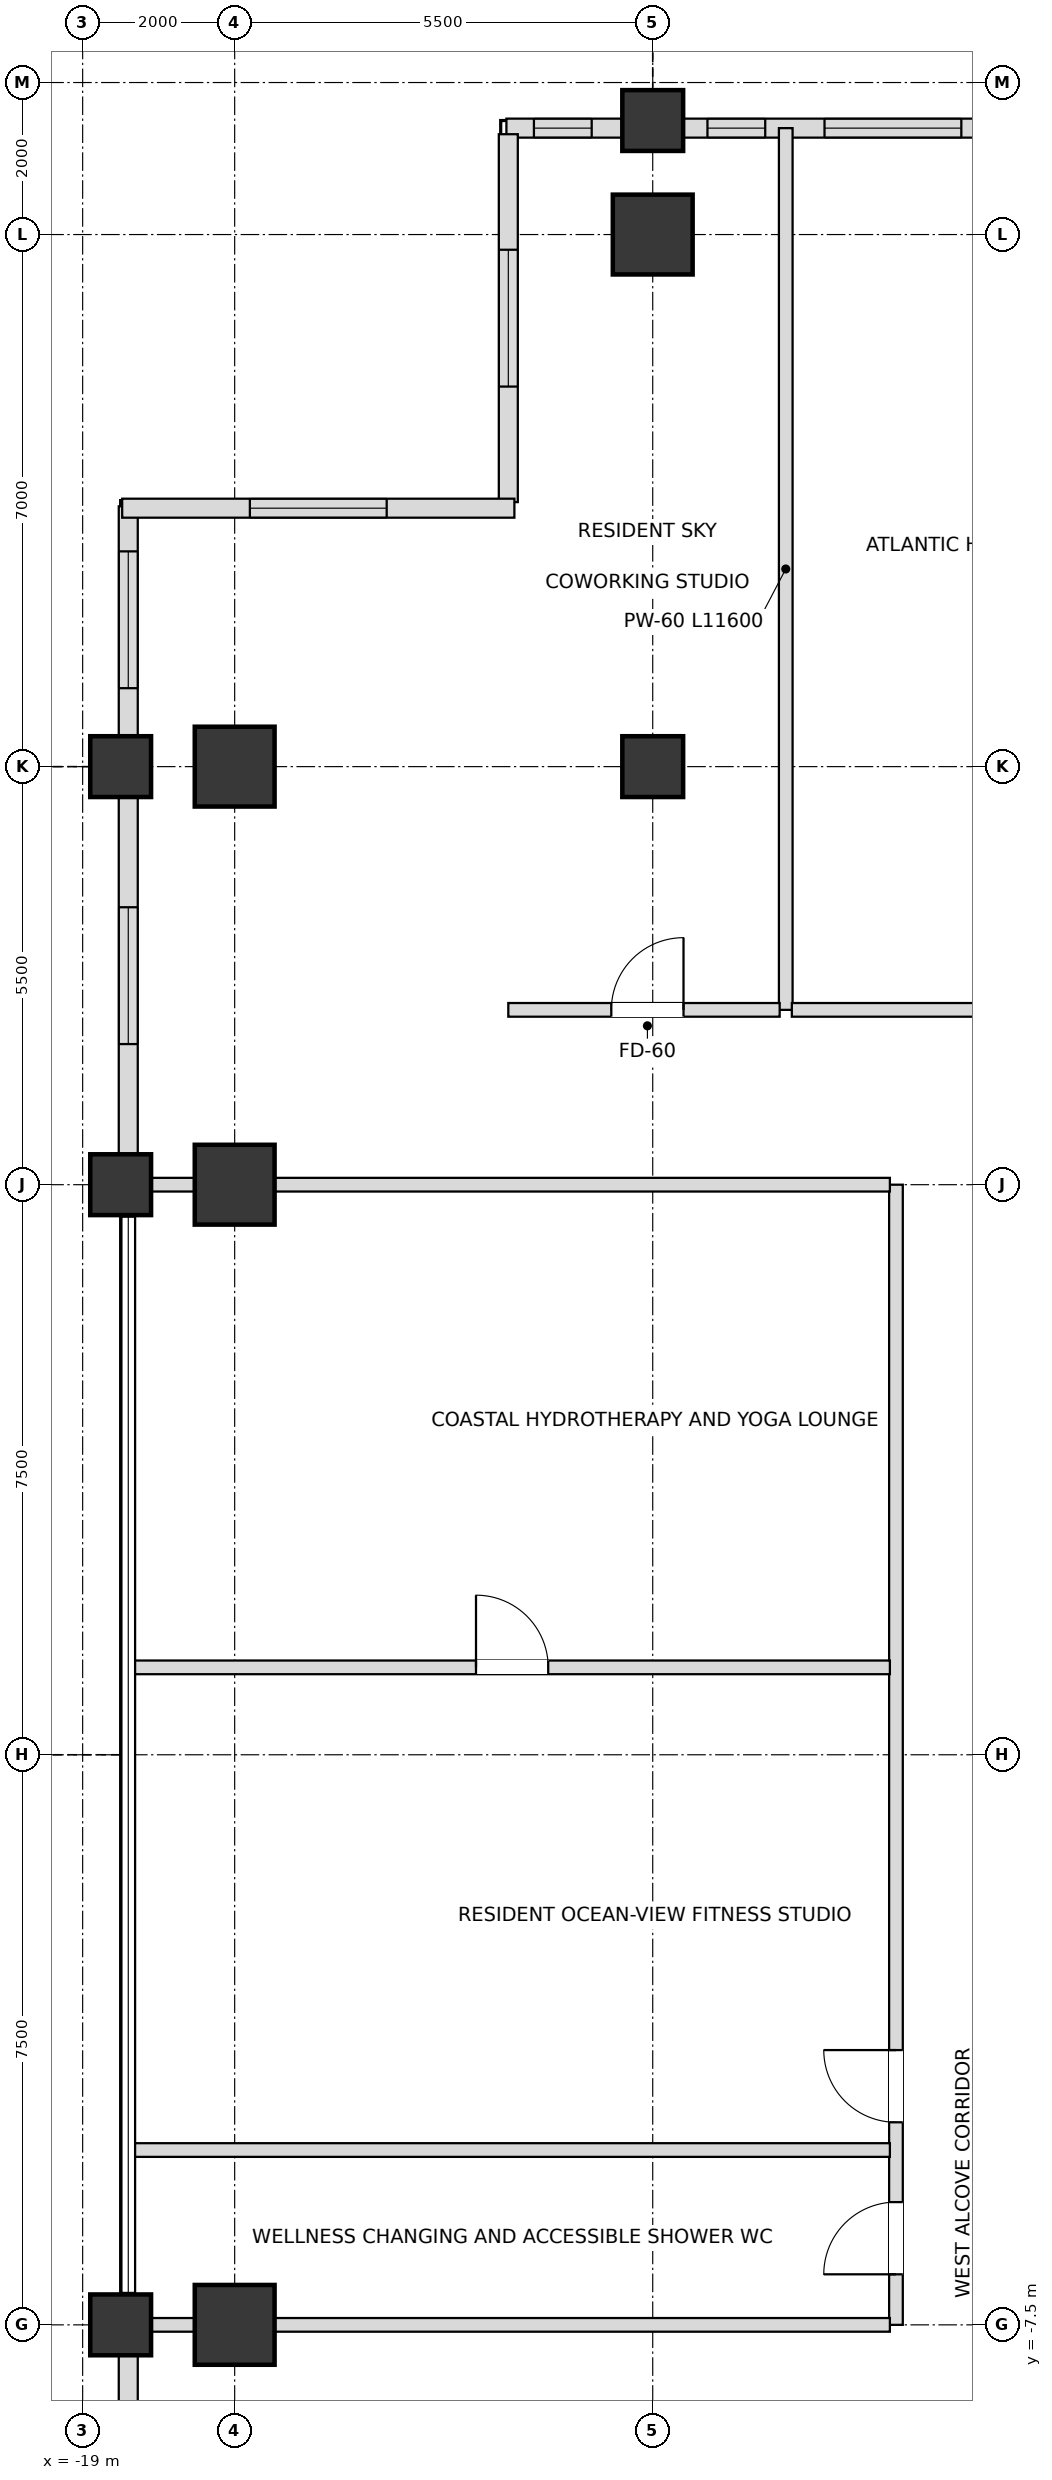
"""IFC4 building model, lengths in metres.
Left out: names, types, materials, properties, quantities, classifications, styles, units other than length and angle.
Written with IfcOpenShell. Run it as: python <this file> out.ifc"""

import sys

from ifc_helpers import new_model, si_unit, direction, frame, frame_2d, origin, origin_2d, place, context, subcontext, project, spatial, rectangle, extrude, element, fill, save


model = new_model("IFC4")
c1 = context("Model", 3, precision=1e-05, world=origin(), true_north=direction((0.0, 1.0)))
c2 = subcontext(c1, "Body", "Model", "MODEL_VIEW")
j1 = project(units=[si_unit("LENGTHUNIT", "METRE"), si_unit("PLANEANGLEUNIT", "RADIAN")], contexts=[c1])
p1 = place(None, origin())
s1 = spatial("IfcSite", under=j1, at=p1, CompositionType="ELEMENT")
p2 = place(p1, origin())
s2 = spatial("IfcBuilding", under=s1, at=p2, CompositionType="ELEMENT")
p3 = place(p2, frame((0.0, 0.0, 208.8)))
s3 = spatial("IfcBuildingStorey", under=s2, at=p3, CompositionType="ELEMENT", Elevation=208.8)
for number, where, z_axis, x_axis in (
    (1, (-11.5, 20.0, 0.0), (0.0, 0.0, 1.0), (1.0, 0.0, 0.0)),
    (2, (-17.0, 13.0, 0.0), (0.0, 0.0, 1.0), (1.0, 0.0, 0.0)),
    (3, (-17.0, 7.5, 0.0), (0.0, 0.0, 1.0), (1.0, 0.0, 0.0)),
    (4, (-17.0, -7.5, 0.0), (0.0, 0.0, 1.0), (1.0, 0.0, 0.0)),
):
    element("IfcColumn", number, at=place(p3, frame(where, z_axis=z_axis, x_axis=x_axis)), inside=s3, PredefinedType="USERDEFINED", context=c2, shape_type="SweptSolid", body=[
        extrude(rectangle(XDim=1.05, YDim=1.05, at=origin_2d()), origin(), (0.0, 0.0, 1.0), 3.6),
    ])
for number, where, z_axis, x_axis in (
    (5, (-11.5, 13.0, 0.0), (0.0, 0.0, 1.0), (1.0, 0.0, 0.0)),
    (6, (-18.5, -7.5, 0.0), (0.0, 0.0, 1.0), (1.0, 0.0, 0.0)),
    (7, (-18.5, 7.5, 0.0), (0.0, 0.0, 1.0), (1.0, 0.0, 0.0)),
    (8, (-18.5, 13.0, 0.0), (0.0, 0.0, 1.0), (1.0, 0.0, 0.0)),
    (9, (-11.5, 21.5, 0.0), (0.0, 0.0, 1.0), (1.0, 0.0, 0.0)),
):
    element("IfcColumn", number, at=place(p3, frame(where, z_axis=z_axis, x_axis=x_axis)), inside=s3, PredefinedType="COLUMN", context=c2, shape_type="SweptSolid", body=[
        extrude(rectangle(XDim=0.8, YDim=0.8, at=origin_2d()), origin(), (0.0, 0.0, 1.0), 3.6),
    ])
p4 = place(p3, frame((-6.895, 21.4, 0.0), z_axis=(0.0, 0.0, 1.0), x_axis=(-1.0, 0.0, 0.0)))
e10 = element("IfcWall", 10, at=p4, inside=s3, PredefinedType="SOLIDWALL", context=c2, shape_type="SweptSolid", body=[
    extrude(rectangle(XDim=4.21, YDim=0.25, at=frame_2d((2.105, 0.0))), origin(), (0.0, 0.0, 1.0), 2.59),
])
p5 = place(p4, frame((0.545, 0.0, 0.72)))
e11 = element("IfcOpeningElement", 11, at=p5, cuts=e10, PredefinedType="OPENING", context=c2, shape_type="SweptSolid", body=[
    extrude(rectangle(XDim=1.8, YDim=1.68, at=frame_2d((0.9, 0.84))), frame((0.0, 0.135, 0.0), z_axis=(0.0, -1.0, 0.0), x_axis=(1.0, 0.0, 0.0)), (0.0, 0.0, 1.0), 0.27),
])
p6 = place(p4, frame((3.125, 0.0, 0.72)))
e12 = element("IfcOpeningElement", 12, at=p6, cuts=e10, PredefinedType="OPENING", context=c2, shape_type="SweptSolid", body=[
    extrude(rectangle(XDim=0.76, YDim=1.68, at=frame_2d((0.38, 0.84))), frame((0.0, 0.135, 0.0), z_axis=(0.0, -1.0, 0.0), x_axis=(1.0, 0.0, 0.0)), (0.0, 0.0, 1.0), 0.27),
])
p7 = place(p3, frame((-11.895, 21.4, 0.0), z_axis=(0.0, 0.0, 1.0), x_axis=(-1.0, 0.0, 0.0)))
e13 = element("IfcWall", 13, at=p7, inside=s3, PredefinedType="SOLIDWALL", context=c2, shape_type="SweptSolid", body=[
    extrude(rectangle(XDim=1.53, YDim=0.25, at=frame_2d((0.765, 0.0))), origin(), (0.0, 0.0, 1.0), 2.59),
])
p8 = place(p7, frame((0.408, 0.0, 0.72)))
e14 = element("IfcOpeningElement", 14, at=p8, cuts=e13, PredefinedType="OPENING", context=c2, shape_type="SweptSolid", body=[
    extrude(rectangle(XDim=0.76, YDim=1.68, at=frame_2d((0.38, 0.84))), frame((0.0, 0.135, 0.0), z_axis=(0.0, -1.0, 0.0), x_axis=(1.0, 0.0, 0.0)), (0.0, 0.0, 1.0), 0.27),
])
p9 = place(p3, frame((-18.4, 16.425, 0.0), z_axis=(0.0, 0.0, 1.0), x_axis=(0.0, -1.0, 0.0)))
e15 = element("IfcWall", 15, at=p9, inside=s3, PredefinedType="SOLIDWALL", context=c2, shape_type="SweptSolid", body=[
    extrude(rectangle(XDim=3.03, YDim=0.25, at=frame_2d((1.515, 0.0))), origin(), (0.0, 0.0, 1.0), 2.59),
])
p10 = place(p9, frame((0.593, 0.0, 0.72)))
e16 = element("IfcOpeningElement", 16, at=p10, cuts=e15, PredefinedType="OPENING", context=c2, shape_type="SweptSolid", body=[
    extrude(rectangle(XDim=1.8, YDim=1.68, at=frame_2d((0.9, 0.84))), frame((0.0, 0.135, 0.0), z_axis=(0.0, -1.0, 0.0), x_axis=(1.0, 0.0, 0.0)), (0.0, 0.0, 1.0), 0.27),
])
p11 = place(p3, frame((-18.4, 12.605, 0.0), z_axis=(0.0, 0.0, 1.0), x_axis=(0.0, -1.0, 0.0)))
e17 = element("IfcWall", 17, at=p11, inside=s3, PredefinedType="SOLIDWALL", context=c2, shape_type="SweptSolid", body=[
    extrude(rectangle(XDim=4.71, YDim=0.25, at=frame_2d((2.355, 0.0))), origin(), (0.0, 0.0, 1.0), 2.59),
])
p12 = place(p11, frame((1.455, 0.0, 0.72)))
e18 = element("IfcOpeningElement", 18, at=p12, cuts=e17, PredefinedType="OPENING", context=c2, shape_type="SweptSolid", body=[
    extrude(rectangle(XDim=1.8, YDim=1.68, at=frame_2d((0.9, 0.84))), frame((0.0, 0.135, 0.0), z_axis=(0.0, -1.0, 0.0), x_axis=(1.0, 0.0, 0.0)), (0.0, 0.0, 1.0), 0.27),
])
p13 = place(p3, frame((-18.4, -7.895, 0.0), z_axis=(0.0, 0.0, 1.0), x_axis=(0.0, -1.0, 0.0)))
e19 = element("IfcWall", 19, at=p13, inside=s3, PredefinedType="SOLIDWALL", context=c2, shape_type="SweptSolid", body=[
    extrude(rectangle(XDim=4.71, YDim=0.25, at=frame_2d((2.355, 0.0))), origin(), (0.0, 0.0, 1.0), 2.59),
])
p14 = place(p13, frame((1.455, 0.0, 0.72)))
e20 = element("IfcOpeningElement", 20, at=p14, cuts=e19, PredefinedType="OPENING", context=c2, shape_type="SweptSolid", body=[
    extrude(rectangle(XDim=1.8, YDim=1.68, at=frame_2d((0.9, 0.84))), frame((0.0, 0.135, 0.0), z_axis=(0.0, -1.0, 0.0), x_axis=(1.0, 0.0, 0.0)), (0.0, 0.0, 1.0), 0.27),
])
p15 = place(p3, frame((-13.4, 21.32, 0.0), z_axis=(0.0, 0.0, 1.0), x_axis=(0.0, -1.0, 0.0)))
e21 = element("IfcWall", 21, at=p15, inside=s3, PredefinedType="SOLIDWALL", context=c2, shape_type="SweptSolid", body=[
    extrude(rectangle(XDim=4.84, YDim=0.25, at=frame_2d((2.42, 0.0))), origin(), (0.0, 0.0, 1.0), 2.59),
])
p16 = place(p15, frame((1.52, 0.0, 0.72)))
e22 = element("IfcOpeningElement", 22, at=p16, cuts=e21, PredefinedType="OPENING", context=c2, shape_type="SweptSolid", body=[
    extrude(rectangle(XDim=1.8, YDim=1.68, at=frame_2d((0.9, 0.84))), frame((0.0, 0.135, 0.0), z_axis=(0.0, -1.0, 0.0), x_axis=(1.0, 0.0, 0.0)), (0.0, 0.0, 1.0), 0.27),
])
p17 = place(p3, frame((-13.32, 16.4, 0.0), z_axis=(0.0, 0.0, 1.0), x_axis=(-1.0, 0.0, 0.0)))
e23 = element("IfcWall", 23, at=p17, inside=s3, PredefinedType="SOLIDWALL", context=c2, shape_type="SweptSolid", body=[
    extrude(rectangle(XDim=5.16, YDim=0.25, at=frame_2d((2.58, 0.0))), origin(), (0.0, 0.0, 1.0), 2.59),
])
p18 = place(p17, frame((1.68, 0.0, 0.72)))
e24 = element("IfcOpeningElement", 24, at=p18, cuts=e23, PredefinedType="OPENING", context=c2, shape_type="SweptSolid", body=[
    extrude(rectangle(XDim=1.8, YDim=1.68, at=frame_2d((0.9, 0.84))), frame((0.0, 0.135, 0.0), z_axis=(0.0, -1.0, 0.0), x_axis=(1.0, 0.0, 0.0)), (0.0, 0.0, 1.0), 0.27),
])
p19 = place(p3, frame((-9.75, 9.8, 0.0), z_axis=(0.0, 0.0, 1.0), x_axis=(0.0, 1.0, 0.0)))
e25 = element("IfcWall", 25, at=p19, inside=s3, PredefinedType="PARTITIONING", context=c2, shape_type="SweptSolid", body=[
    extrude(rectangle(XDim=11.6, YDim=0.18, at=frame_2d((5.8, 0.0))), origin(), (0.0, 0.0, 1.0), 2.746),
])
p20 = place(p3, frame((-8.3, -7.5, 0.0), z_axis=(0.0, 0.0, 1.0), x_axis=(0.0, 1.0, 0.0)))
e26 = element("IfcWall", 26, at=p20, inside=s3, PredefinedType="PARTITIONING", context=c2, shape_type="SweptSolid", body=[
    extrude(rectangle(XDim=15.0, YDim=0.18, at=frame_2d((7.5, 0.0))), origin(), (0.0, 0.0, 1.0), 3.3),
])
p21 = place(p20, frame((0.665, 0.0, 0.0)))
e27 = element("IfcOpeningElement", 27, at=p21, cuts=e26, PredefinedType="OPENING", context=c2, shape_type="SweptSolid", body=[
    extrude(rectangle(XDim=0.95, YDim=2.15, at=frame_2d((0.475, 1.075))), frame((0.0, 0.1, 0.0), z_axis=(0.0, -1.0, 0.0), x_axis=(1.0, 0.0, 0.0)), (0.0, 0.0, 1.0), 0.2),
])
p22 = place(p20, frame((2.665, 0.0, 0.0)))
e28 = element("IfcOpeningElement", 28, at=p22, cuts=e26, PredefinedType="OPENING", context=c2, shape_type="SweptSolid", body=[
    extrude(rectangle(XDim=0.95, YDim=2.15, at=frame_2d((0.475, 1.075))), frame((0.0, 0.1, 0.0), z_axis=(0.0, -1.0, 0.0), x_axis=(1.0, 0.0, 0.0)), (0.0, 0.0, 1.0), 0.2),
])
p23 = place(p3, frame((-18.4, -7.5, 0.0), z_axis=(0.0, 0.0, 1.0), x_axis=(1.0, 0.0, 0.0)))
e29 = element("IfcWall", 29, at=p23, inside=s3, PredefinedType="PARTITIONING", context=c2, shape_type="SweptSolid", body=[
    extrude(rectangle(XDim=10.02, YDim=0.18, at=frame_2d((5.01, 0.0))), origin(), (0.0, 0.0, 1.0), 2.746),
])
p24 = place(p3, frame((-18.32, -5.2, 0.0), z_axis=(0.0, 0.0, 1.0), x_axis=(1.0, 0.0, 0.0)))
e30 = element("IfcWall", 30, at=p24, inside=s3, PredefinedType="PARTITIONING", context=c2, shape_type="SweptSolid", body=[
    extrude(rectangle(XDim=9.94, YDim=0.18, at=frame_2d((4.97, 0.0))), origin(), (0.0, 0.0, 1.0), 2.746),
])
p25 = place(p3, frame((-18.32, 1.15, 0.0), z_axis=(0.0, 0.0, 1.0), x_axis=(1.0, 0.0, 0.0)))
e31 = element("IfcWall", 31, at=p25, inside=s3, PredefinedType="PARTITIONING", context=c2, shape_type="SweptSolid", body=[
    extrude(rectangle(XDim=9.94, YDim=0.18, at=frame_2d((4.97, 0.0))), origin(), (0.0, 0.0, 1.0), 2.746),
])
p26 = place(p25, frame((4.495, 0.0, 0.0)))
e32 = element("IfcOpeningElement", 32, at=p26, cuts=e31, PredefinedType="OPENING", context=c2, shape_type="SweptSolid", body=[
    extrude(rectangle(XDim=0.95, YDim=2.15, at=frame_2d((0.475, 1.075))), frame((0.0, 0.1, 0.0), z_axis=(0.0, -1.0, 0.0), x_axis=(1.0, 0.0, 0.0)), (0.0, 0.0, 1.0), 0.2),
])
p27 = place(p3, frame((-18.4, 7.5, 0.0), z_axis=(0.0, 0.0, 1.0), x_axis=(1.0, 0.0, 0.0)))
e33 = element("IfcWall", 33, at=p27, inside=s3, PredefinedType="PARTITIONING", context=c2, shape_type="SweptSolid", body=[
    extrude(rectangle(XDim=10.02, YDim=0.18, at=frame_2d((5.01, 0.0))), origin(), (0.0, 0.0, 1.0), 2.746),
])
p28 = place(p3, frame((-13.4, 9.8, 0.0), z_axis=(0.0, 0.0, 1.0), x_axis=(1.0, 0.0, 0.0)))
e34 = element("IfcWall", 34, at=p28, inside=s3, PredefinedType="PARTITIONING", context=c2, shape_type="SweptSolid", body=[
    extrude(rectangle(XDim=3.57, YDim=0.18, at=frame_2d((1.785, 0.0))), origin(), (0.0, 0.0, 1.0), 3.3),
])
p29 = place(p28, frame((1.355, 0.0, 0.0)))
e35 = element("IfcOpeningElement", 35, at=p29, cuts=e34, PredefinedType="OPENING", context=c2, shape_type="SweptSolid", body=[
    extrude(rectangle(XDim=0.95, YDim=2.15, at=frame_2d((0.475, 1.075))), frame((0.0, 0.1, 0.0), z_axis=(0.0, -1.0, 0.0), x_axis=(1.0, 0.0, 0.0)), (0.0, 0.0, 1.0), 0.2),
])
p30 = place(p3, frame((-9.67, 9.8, 0.0), z_axis=(0.0, 0.0, 1.0), x_axis=(1.0, 0.0, 0.0)))
e36 = element("IfcWall", 36, at=p30, inside=s3, PredefinedType="PARTITIONING", context=c2, shape_type="SweptSolid", body=[
    extrude(rectangle(XDim=6.24, YDim=0.18, at=frame_2d((3.12, 0.0))), origin(), (0.0, 0.0, 1.0), 2.746),
])
p31 = place(p30, frame((2.655, 0.0, 0.0)))
e37 = element("IfcOpeningElement", 37, at=p31, cuts=e36, PredefinedType="OPENING", context=c2, shape_type="SweptSolid", body=[
    extrude(rectangle(XDim=0.95, YDim=2.15, at=frame_2d((0.475, 1.075))), frame((0.0, 0.1, 0.0), z_axis=(0.0, -1.0, 0.0), x_axis=(1.0, 0.0, 0.0)), (0.0, 0.0, 1.0), 0.2),
])
p32 = place(p5, origin())
e38 = element("IfcWindow", 38, at=p32, inside=s3, PartitioningType="SINGLE_PANEL", PredefinedType="WINDOW", context=c2, shape_type="SweptSolid", body=[
    extrude(rectangle(XDim=1.8, YDim=1.68, at=frame_2d((0.9, 0.84))), frame((0.0, 0.03, 0.0), z_axis=(0.0, -1.0, 0.0), x_axis=(1.0, 0.0, 0.0)), (0.0, 0.0, 1.0), 0.06),
])
fill(e11, e38)
p33 = place(p6, origin())
e39 = element("IfcWindow", 39, at=p33, inside=s3, PartitioningType="SINGLE_PANEL", PredefinedType="WINDOW", context=c2, shape_type="SweptSolid", body=[
    extrude(rectangle(XDim=0.76, YDim=1.68, at=frame_2d((0.38, 0.84))), frame((0.0, 0.03, 0.0), z_axis=(0.0, -1.0, 0.0), x_axis=(1.0, 0.0, 0.0)), (0.0, 0.0, 1.0), 0.06),
])
fill(e12, e39)
p34 = place(p8, origin())
e40 = element("IfcWindow", 40, at=p34, inside=s3, PartitioningType="SINGLE_PANEL", PredefinedType="WINDOW", context=c2, shape_type="SweptSolid", body=[
    extrude(rectangle(XDim=0.76, YDim=1.68, at=frame_2d((0.38, 0.84))), frame((0.0, 0.03, 0.0), z_axis=(0.0, -1.0, 0.0), x_axis=(1.0, 0.0, 0.0)), (0.0, 0.0, 1.0), 0.06),
])
fill(e14, e40)
p35 = place(p10, origin())
e41 = element("IfcWindow", 41, at=p35, inside=s3, PartitioningType="SINGLE_PANEL", PredefinedType="WINDOW", context=c2, shape_type="SweptSolid", body=[
    extrude(rectangle(XDim=1.8, YDim=1.68, at=frame_2d((0.9, 0.84))), frame((0.0, 0.03, 0.0), z_axis=(0.0, -1.0, 0.0), x_axis=(1.0, 0.0, 0.0)), (0.0, 0.0, 1.0), 0.06),
])
fill(e16, e41)
p36 = place(p12, origin())
e42 = element("IfcWindow", 42, at=p36, inside=s3, PartitioningType="SINGLE_PANEL", PredefinedType="WINDOW", context=c2, shape_type="SweptSolid", body=[
    extrude(rectangle(XDim=1.8, YDim=1.68, at=frame_2d((0.9, 0.84))), frame((0.0, 0.03, 0.0), z_axis=(0.0, -1.0, 0.0), x_axis=(1.0, 0.0, 0.0)), (0.0, 0.0, 1.0), 0.06),
])
fill(e18, e42)
p37 = place(p16, origin())
e43 = element("IfcWindow", 43, at=p37, inside=s3, PartitioningType="SINGLE_PANEL", PredefinedType="WINDOW", context=c2, shape_type="SweptSolid", body=[
    extrude(rectangle(XDim=1.8, YDim=1.68, at=frame_2d((0.9, 0.84))), frame((0.0, 0.03, 0.0), z_axis=(0.0, -1.0, 0.0), x_axis=(1.0, 0.0, 0.0)), (0.0, 0.0, 1.0), 0.06),
])
fill(e22, e43)
p38 = place(p18, origin())
e44 = element("IfcWindow", 44, at=p38, inside=s3, PartitioningType="SINGLE_PANEL", PredefinedType="WINDOW", context=c2, shape_type="SweptSolid", body=[
    extrude(rectangle(XDim=1.8, YDim=1.68, at=frame_2d((0.9, 0.84))), frame((0.0, 0.03, 0.0), z_axis=(0.0, -1.0, 0.0), x_axis=(1.0, 0.0, 0.0)), (0.0, 0.0, 1.0), 0.06),
])
fill(e24, e44)
p39 = place(p29, origin())
e45 = element("IfcDoor", 45, at=p39, inside=s3, OperationType="SINGLE_SWING_RIGHT", PredefinedType="DOOR", context=c2, shape_type="SweptSolid", body=[
    extrude(rectangle(XDim=0.95, YDim=2.15, at=frame_2d((0.475, 1.075))), frame((0.0, 0.025, 0.0), z_axis=(0.0, -1.0, 0.0), x_axis=(1.0, 0.0, 0.0)), (0.0, 0.0, 1.0), 0.05),
])
fill(e35, e45)
p40 = place(p21, origin())
e46 = element("IfcDoor", 46, at=p40, inside=s3, OperationType="SINGLE_SWING_LEFT", PredefinedType="DOOR", context=c2, shape_type="SweptSolid", body=[
    extrude(rectangle(XDim=0.95, YDim=2.15, at=frame_2d((0.475, 1.075))), frame((0.0, 0.025, 0.0), z_axis=(0.0, -1.0, 0.0), x_axis=(1.0, 0.0, 0.0)), (0.0, 0.0, 1.0), 0.05),
])
fill(e27, e46)
p41 = place(p22, origin())
e47 = element("IfcDoor", 47, at=p41, inside=s3, OperationType="SINGLE_SWING_RIGHT", PredefinedType="DOOR", context=c2, shape_type="SweptSolid", body=[
    extrude(rectangle(XDim=0.95, YDim=2.15, at=frame_2d((0.475, 1.075))), frame((0.0, 0.025, 0.0), z_axis=(0.0, -1.0, 0.0), x_axis=(1.0, 0.0, 0.0)), (0.0, 0.0, 1.0), 0.05),
])
fill(e28, e47)
p42 = place(p26, origin())
e48 = element("IfcDoor", 48, at=p42, inside=s3, OperationType="SINGLE_SWING_LEFT", PredefinedType="DOOR", context=c2, shape_type="SweptSolid", body=[
    extrude(rectangle(XDim=0.95, YDim=2.15, at=frame_2d((0.475, 1.075))), frame((0.0, 0.025, 0.0), z_axis=(0.0, -1.0, 0.0), x_axis=(1.0, 0.0, 0.0)), (0.0, 0.0, 1.0), 0.05),
])
fill(e32, e48)
save(model, sys.argv[1])
